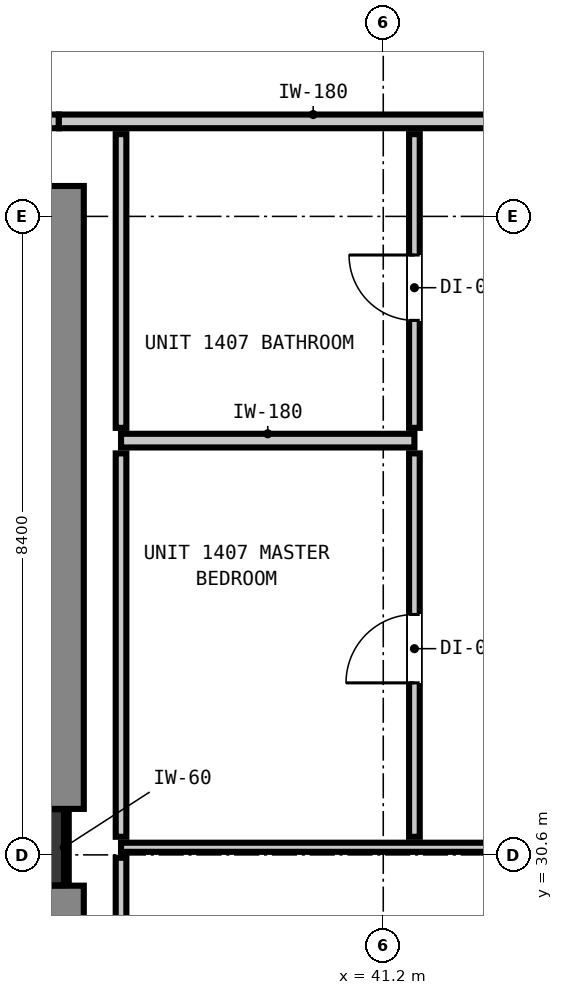
"""IFC4 building model, lengths in metres.
Left out: names, types, materials, properties, quantities, classifications, styles, units other than length and angle.
Written with IfcOpenShell. Run it as: python <this file> out.ifc"""

import sys

from ifc_helpers import new_model, si_unit, direction, frame, frame_2d, origin, origin_2d, place, context, subcontext, project, spatial, rectangle, extrude, element, fill, save


model = new_model("IFC4")
c1 = context("Model", 3, precision=1e-05, world=origin(), true_north=direction((0.0, 1.0)))
c2 = subcontext(c1, "Body", "Model", "MODEL_VIEW")
j1 = project(units=[si_unit("LENGTHUNIT", "METRE"), si_unit("PLANEANGLEUNIT", "RADIAN")], contexts=[c1])
p1 = place(None, origin())
s1 = spatial("IfcSite", under=j1, at=p1, CompositionType="ELEMENT")
p2 = place(p1, origin())
s2 = spatial("IfcBuilding", under=s1, at=p2, CompositionType="ELEMENT")
p3 = place(p2, frame((0.0, 0.0, 51.88)))
s3 = spatial("IfcBuildingStorey", under=s2, at=p3, CompositionType="ELEMENT", Elevation=51.88)
p4 = place(p3, frame((36.5, 30.7, 0.0), z_axis=(0.0, 0.0, 1.0), x_axis=(1.0, 0.0, 0.0)))
e1 = element("IfcColumn", 1, at=p4, inside=s3, PredefinedType="COLUMN", context=c2, shape_type="SweptSolid", body=[
    extrude(rectangle(XDim=1.0, YDim=1.0, at=origin_2d()), origin(), (0.0, 0.0, 1.0), 3.32),
])
p5 = place(p3, frame((36.66, 22.0, 0.0), z_axis=(0.0, 0.0, 1.0), x_axis=(0.0, 1.0, 0.0)))
e2 = element("IfcWall", 2, at=p5, inside=s3, PredefinedType="SHEAR", context=c2, shape_type="SweptSolid", body=[
    extrude(rectangle(XDim=8.195, YDim=1.2, at=frame_2d((4.098, 0.0))), origin(), (0.0, 0.0, 1.0), 3.32),
])
p6 = place(p3, frame((36.66, 31.205, 0.0), z_axis=(0.0, 0.0, 1.0), x_axis=(0.0, 1.0, 0.0)))
e3 = element("IfcWall", 3, at=p6, inside=s3, PredefinedType="SHEAR", context=c2, shape_type="SweptSolid", body=[
    extrude(rectangle(XDim=8.195, YDim=1.2, at=frame_2d((4.097, 0.0))), origin(), (0.0, 0.0, 1.0), 3.32),
])
p7 = place(p3, frame((37.75, 36.05, 0.0), z_axis=(0.0, 0.0, 1.0), x_axis=(1.0, 0.0, 0.0)))
e4 = element("IfcWall", 4, at=p7, inside=s3, PredefinedType="PARTITIONING", context=c2, shape_type="SweptSolid", body=[
    extrude(rectangle(XDim=3.86, YDim=0.18, at=frame_2d((1.93, 0.0))), origin(), (0.0, 0.0, 1.0), 3.06),
])
p8 = place(p3, frame((10.15, 40.25, 0.0), z_axis=(0.0, 0.0, 1.0), x_axis=(1.0, 0.0, 0.0)))
e5 = element("IfcWall", 5, at=p8, inside=s3, PredefinedType="PARTITIONING", context=c2, shape_type="SweptSolid", body=[
    extrude(rectangle(XDim=26.782, YDim=0.18, at=frame_2d((13.391, 0.0))), origin(), (0.0, 0.0, 1.0), 3.06),
])
p9 = place(p8, frame((7.285, 0.0, 0.0)))
e6 = element("IfcOpeningElement", 6, at=p9, cuts=e5, PredefinedType="OPENING", context=c2, shape_type="SweptSolid", body=[
    extrude(rectangle(XDim=1.4, YDim=2.15, at=frame_2d((0.7, 1.075))), frame((0.0, 0.1, 0.0), z_axis=(0.0, -1.0, 0.0), x_axis=(1.0, 0.0, 0.0)), (0.0, 0.0, 1.0), 0.2),
])
p10 = place(p8, frame((0.324, 0.0, 0.0)))
e7 = element("IfcOpeningElement", 7, at=p10, cuts=e5, PredefinedType="OPENING", context=c2, shape_type="SweptSolid", body=[
    extrude(rectangle(XDim=1.4, YDim=2.15, at=frame_2d((0.7, 1.075))), frame((0.0, 0.1, 0.0), z_axis=(0.0, -1.0, 0.0), x_axis=(1.0, 0.0, 0.0)), (0.0, 0.0, 1.0), 0.2),
])
p11 = place(p3, frame((36.932, 40.25, 0.0), z_axis=(0.0, 0.0, 1.0), x_axis=(1.0, 0.0, 0.0)))
e8 = element("IfcWall", 8, at=p11, inside=s3, PredefinedType="PARTITIONING", context=c2, shape_type="SweptSolid", body=[
    extrude(rectangle(XDim=12.386, YDim=0.18, at=frame_2d((6.193, 0.0))), origin(), (0.0, 0.0, 1.0), 2.445),
])
p12 = place(p11, frame((6.792, 0.0, 0.0)))
e9 = element("IfcOpeningElement", 9, at=p12, cuts=e8, PredefinedType="OPENING", context=c2, shape_type="SweptSolid", body=[
    extrude(rectangle(XDim=1.0, YDim=2.15, at=frame_2d((0.5, 1.075))), frame((0.0, 0.1, 0.0), z_axis=(0.0, -1.0, 0.0), x_axis=(1.0, 0.0, 0.0)), (0.0, 0.0, 1.0), 0.2),
])
p13 = place(p3, frame((37.75, 30.7, 0.0), z_axis=(0.0, 0.0, 1.0), x_axis=(1.0, 0.0, 0.0)))
e10 = element("IfcWall", 10, at=p13, inside=s3, PredefinedType="PARTITIONING", context=c2, shape_type="SweptSolid", body=[
    extrude(rectangle(XDim=11.328, YDim=0.12, at=frame_2d((5.664, 0.0))), origin(), (0.0, 0.0, 1.0), 2.295),
])
p14 = place(p3, frame((37.75, 21.348, 0.0), z_axis=(0.0, 0.0, 1.0), x_axis=(0.0, 1.0, 0.0)))
e11 = element("IfcWall", 11, at=p14, inside=s3, PredefinedType="PARTITIONING", context=c2, shape_type="SweptSolid", body=[
    extrude(rectangle(XDim=9.214, YDim=0.14, at=frame_2d((4.607, 0.0))), origin(), (0.0, 0.0, 1.0), 3.06),
])
p15 = place(p3, frame((37.75, 30.838, 0.0), z_axis=(0.0, 0.0, 1.0), x_axis=(0.0, 1.0, 0.0)))
e12 = element("IfcWall", 12, at=p15, inside=s3, PredefinedType="PARTITIONING", context=c2, shape_type="SweptSolid", body=[
    extrude(rectangle(XDim=5.044, YDim=0.14, at=frame_2d((2.522, 0.0))), origin(), (0.0, 0.0, 1.0), 3.06),
])
p16 = place(p3, frame((37.75, 36.218, 0.0), z_axis=(0.0, 0.0, 1.0), x_axis=(0.0, 1.0, 0.0)))
e13 = element("IfcWall", 13, at=p16, inside=s3, PredefinedType="PARTITIONING", context=c2, shape_type="SweptSolid", body=[
    extrude(rectangle(XDim=3.864, YDim=0.14, at=frame_2d((1.932, 0.0))), origin(), (0.0, 0.0, 1.0), 3.06),
])
p17 = place(p3, frame((41.61, 30.838, 0.0), z_axis=(0.0, 0.0, 1.0), x_axis=(0.0, 1.0, 0.0)))
e14 = element("IfcWall", 14, at=p17, inside=s3, PredefinedType="PARTITIONING", context=c2, shape_type="SweptSolid", body=[
    extrude(rectangle(XDim=5.044, YDim=0.14, at=frame_2d((2.522, 0.0))), origin(), (0.0, 0.0, 1.0), 3.06),
])
p18 = place(p17, frame((2.025, 0.0, 0.0)))
e15 = element("IfcOpeningElement", 15, at=p18, cuts=e14, PredefinedType="OPENING", context=c2, shape_type="SweptSolid", body=[
    extrude(rectangle(XDim=0.9, YDim=2.1, at=frame_2d((0.45, 1.05))), frame((0.0, 0.08, 0.0), z_axis=(0.0, -1.0, 0.0), x_axis=(1.0, 0.0, 0.0)), (0.0, 0.0, 1.0), 0.16),
])
p19 = place(p3, frame((41.61, 36.218, 0.0), z_axis=(0.0, 0.0, 1.0), x_axis=(0.0, 1.0, 0.0)))
e16 = element("IfcWall", 16, at=p19, inside=s3, PredefinedType="PARTITIONING", context=c2, shape_type="SweptSolid", body=[
    extrude(rectangle(XDim=3.864, YDim=0.14, at=frame_2d((1.932, 0.0))), origin(), (0.0, 0.0, 1.0), 3.06),
])
p20 = place(p19, frame((1.414, 0.0, 0.0)))
e17 = element("IfcOpeningElement", 17, at=p20, cuts=e16, PredefinedType="OPENING", context=c2, shape_type="SweptSolid", body=[
    extrude(rectangle(XDim=0.86, YDim=2.02, at=frame_2d((0.43, 1.01))), frame((0.0, 0.08, 0.0), z_axis=(0.0, -1.0, 0.0), x_axis=(1.0, 0.0, 0.0)), (0.0, 0.0, 1.0), 0.16),
])
p21 = place(p3, frame((37.032, 30.21, 0.0), z_axis=(0.0, 0.0, 1.0), x_axis=(0.0, 1.0, 0.0)))
e18 = element("IfcWall", 18, at=p21, inside=s3, PredefinedType="PARTITIONING", context=c2, shape_type="SweptSolid", body=[
    extrude(rectangle(XDim=0.98, YDim=0.06, at=frame_2d((0.49, 0.0))), origin(), (0.0, 0.0, 1.0), 1.45),
])
p22 = place(p20, origin())
e19 = element("IfcDoor", 19, at=p22, inside=s3, OperationType="SINGLE_SWING_RIGHT", PredefinedType="DOOR", context=c2, shape_type="SweptSolid", body=[
    extrude(rectangle(XDim=0.86, YDim=2.02, at=frame_2d((0.43, 1.01))), frame((0.0, 0.025, 0.0), z_axis=(0.0, -1.0, 0.0), x_axis=(1.0, 0.0, 0.0)), (0.0, 0.0, 1.0), 0.05),
])
fill(e17, e19)
p23 = place(p18, origin())
e20 = element("IfcDoor", 20, at=p23, inside=s3, OperationType="SINGLE_SWING_LEFT", PredefinedType="DOOR", context=c2, shape_type="SweptSolid", body=[
    extrude(rectangle(XDim=0.9, YDim=2.1, at=frame_2d((0.45, 1.05))), frame((0.0, 0.025, 0.0), z_axis=(0.0, -1.0, 0.0), x_axis=(1.0, 0.0, 0.0)), (0.0, 0.0, 1.0), 0.05),
])
fill(e15, e20)
save(model, sys.argv[1])
